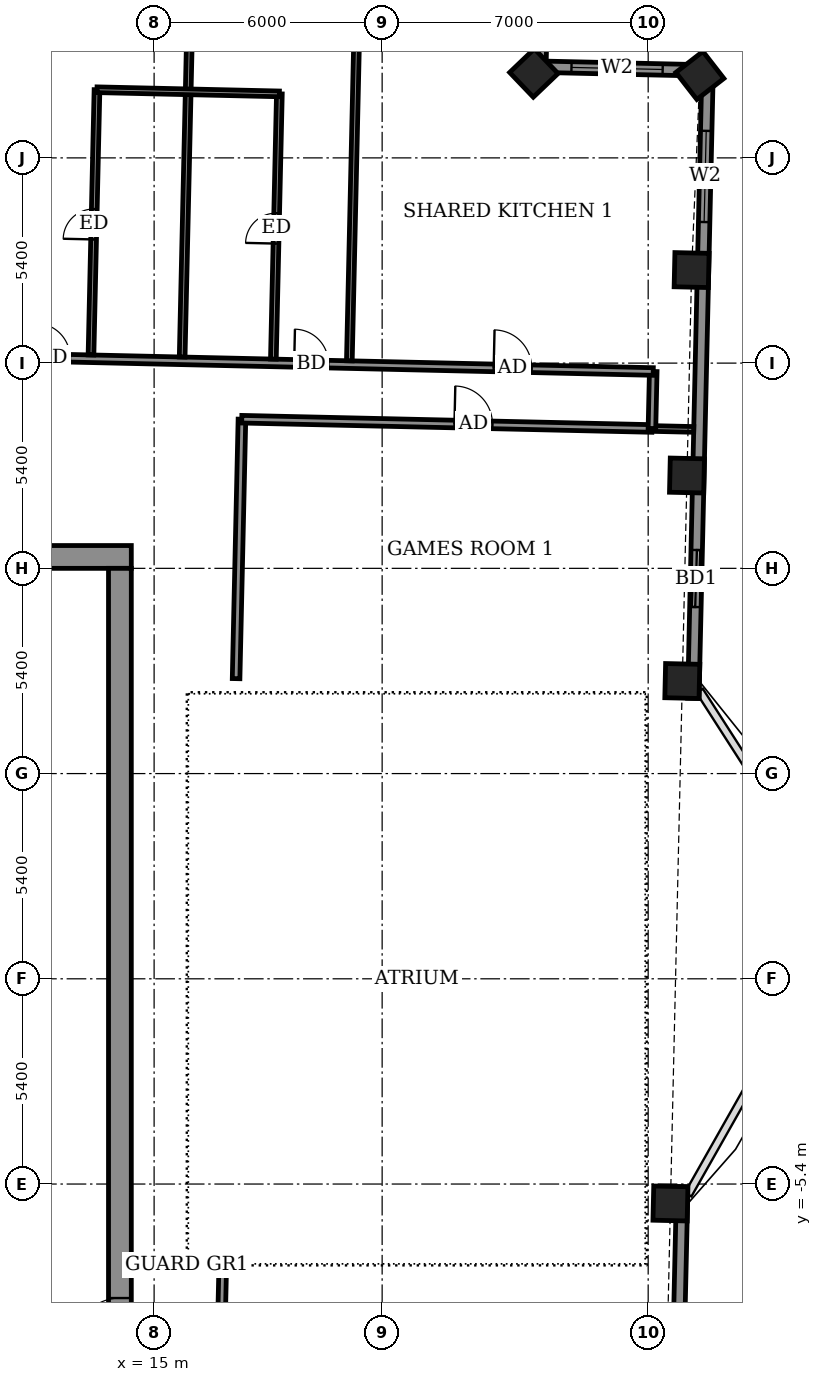
"""IFC4 building model, lengths in metres.
Left out: names, types, materials, properties, quantities, classifications, styles, units other than length and angle.
Written with IfcOpenShell. Run it as: python <this file> out.ifc"""

import sys

from ifc_helpers import new_model, si_unit, direction, frame, frame_2d, origin, origin_2d, place, context, subcontext, project, spatial, rectangle, extrude, element, fill, save


model = new_model("IFC4")
c1 = context("Model", 3, precision=1e-05, world=origin(), true_north=direction((0.0, 1.0)))
c2 = subcontext(c1, "Body", "Model", "MODEL_VIEW")
j1 = project(units=[si_unit("LENGTHUNIT", "METRE"), si_unit("PLANEANGLEUNIT", "RADIAN")], contexts=[c1])
p1 = place(None, origin())
s1 = spatial("IfcSite", under=j1, at=p1, CompositionType="ELEMENT")
p2 = place(p1, origin())
s2 = spatial("IfcBuilding", under=s1, at=p2, CompositionType="ELEMENT")
p3 = place(p2, frame((0.0, 0.0, 306.1)))
s3 = spatial("IfcBuildingStorey", under=s2, at=p3, CompositionType="ELEMENT", Elevation=306.1)
for number, where, z_axis, x_axis in (
    (1, (28.586, -5.912, -0.55), (0.0, 0.0, 1.0), (0.023, 1.0, 0.0)),
    (2, (28.898, 7.835, -0.55), (0.0, 0.0, 1.0), (0.023, 1.0, 0.0)),
    (3, (29.021, 13.242, -0.55), (0.0, 0.0, 1.0), (0.023, 1.0, 0.0)),
    (4, (29.143, 18.648, -0.55), (0.0, 0.0, 1.0), (0.023, 1.0, 0.0)),
    (5, (29.361, 23.769, -0.55), (0.0, 0.0, 1.0), (-0.613, 0.79, 0.0)),
    (6, (24.992, 23.834, -0.55), (0.0, 0.0, 1.0), (-0.691, 0.723, 0.0)),
):
    element("IfcColumn", number, at=place(p3, frame(where, z_axis=z_axis, x_axis=x_axis)), inside=s3, PredefinedType="COLUMN", context=c2, shape_type="SweptSolid", body=[
        extrude(rectangle(XDim=0.9, YDim=0.9, at=origin_2d()), origin(), (0.0, 0.0, 1.0), 3.6),
    ])
p4 = place(p3, frame((28.544, -20.99, 0.0), z_axis=(0.0, 0.0, 1.0), x_axis=(0.022676396018, 0.999742857471, 0.0)))
e7 = element("IfcWall", 7, at=p4, inside=s3, PredefinedType="SOLIDWALL", context=c2, shape_type="SweptSolid", body=[
    extrude(rectangle(XDim=15.525, YDim=0.3, at=frame_2d((7.762, 0.0))), origin(), (0.0, 0.0, 1.0), 2.55),
])
p5 = place(p4, frame((1.895, 0.0, 0.0)))
e8 = element("IfcOpeningElement", 8, at=p5, cuts=e7, PredefinedType="OPENING", context=c2, shape_type="SweptSolid", body=[
    extrude(rectangle(XDim=1.5, YDim=2.4, at=frame_2d((0.75, 1.2))), frame((0.0, 0.16, 0.0), z_axis=(0.0, -1.0, 0.0), x_axis=(1.0, 0.0, 0.0)), (0.0, 0.0, 1.0), 0.32),
])
p6 = place(p4, frame((10.946, 0.0, 0.9)))
e9 = element("IfcOpeningElement", 9, at=p6, cuts=e7, PredefinedType="OPENING", context=c2, shape_type="SweptSolid", body=[
    extrude(rectangle(XDim=1.2, YDim=1.5, at=frame_2d((0.6, 0.75))), frame((0.0, 0.16, 0.0), z_axis=(0.0, -1.0, 0.0), x_axis=(1.0, 0.0, 0.0)), (0.0, 0.0, 1.0), 0.32),
])
p7 = place(p3, frame((29.188, 7.379, 0.0), z_axis=(0.0, 0.0, 1.0), x_axis=(0.022693884957, 0.99974246063, 0.0)))
e10 = element("IfcWall", 10, at=p7, inside=s3, PredefinedType="SOLIDWALL", context=c2, shape_type="SweptSolid", body=[
    extrude(rectangle(XDim=16.524, YDim=0.3, at=frame_2d((8.262, 0.0))), origin(), (0.0, 0.0, 1.0), 2.55),
])
p8 = place(p7, frame((2.404, 0.0, 0.0)))
e11 = element("IfcOpeningElement", 11, at=p8, cuts=e10, PredefinedType="OPENING", context=c2, shape_type="SweptSolid", body=[
    extrude(rectangle(XDim=1.5, YDim=2.4, at=frame_2d((0.75, 1.2))), frame((0.0, 0.16, 0.0), z_axis=(0.0, -1.0, 0.0), x_axis=(1.0, 0.0, 0.0)), (0.0, 0.0, 1.0), 0.32),
])
p9 = place(p7, frame((12.536, 0.0, 0.9)))
e12 = element("IfcOpeningElement", 12, at=p9, cuts=e10, PredefinedType="OPENING", context=c2, shape_type="SweptSolid", body=[
    extrude(rectangle(XDim=2.4, YDim=1.5, at=frame_2d((1.2, 0.75))), frame((0.0, 0.16, 0.0), z_axis=(0.0, -1.0, 0.0), x_axis=(1.0, 0.0, 0.0)), (0.0, 0.0, 1.0), 0.32),
])
p10 = place(p3, frame((29.563, 23.899, 0.0), z_axis=(0.0, 0.0, 1.0), x_axis=(-0.999741204967, 0.022749133868, 0.0)))
e13 = element("IfcWall", 13, at=p10, inside=s3, PredefinedType="SOLIDWALL", context=c2, shape_type="SweptSolid", body=[
    extrude(rectangle(XDim=4.4, YDim=0.3, at=frame_2d((2.2, 0.0))), origin(), (0.0, 0.0, 1.0), 2.55),
])
p11 = place(p10, frame((1.182, 0.0, 0.9)))
e14 = element("IfcOpeningElement", 14, at=p11, cuts=e13, PredefinedType="OPENING", context=c2, shape_type="SweptSolid", body=[
    extrude(rectangle(XDim=2.4, YDim=1.5, at=frame_2d((1.2, 0.75))), frame((0.0, 0.16, 0.0), z_axis=(0.0, -1.0, 0.0), x_axis=(1.0, 0.0, 0.0)), (0.0, 0.0, 1.0), 0.32),
])
p12 = place(p3, frame((25.164, 23.999, 0.0), z_axis=(0.0, 0.0, 1.0), x_axis=(0.02269871331, 0.999742351016, 0.0)))
e15 = element("IfcWall", 15, at=p12, inside=s3, PredefinedType="SOLIDWALL", context=c2, shape_type="SweptSolid", body=[
    extrude(rectangle(XDim=4.399, YDim=0.3, at=frame_2d((2.2, 0.0))), origin(), (0.0, 0.0, 1.0), 2.55),
])
p13 = place(p12, frame((0.807, 0.0, 0.9)))
e16 = element("IfcOpeningElement", 16, at=p13, cuts=e15, PredefinedType="OPENING", context=c2, shape_type="SweptSolid", body=[
    extrude(rectangle(XDim=2.4, YDim=1.5, at=frame_2d((1.2, 0.75))), frame((0.0, 0.16, 0.0), z_axis=(0.0, -1.0, 0.0), x_axis=(1.0, 0.0, 0.0)), (0.0, 0.0, 1.0), 0.32),
])
p14 = place(p3, frame((16.684, -12.919, 0.0), z_axis=(0.0, 0.0, 1.0), x_axis=(0.022667483124, 0.999743059595, 0.0)))
e17 = element("IfcWall", 17, at=p14, inside=s3, PredefinedType="PARTITIONING", context=c2, shape_type="SweptSolid", body=[
    extrude(rectangle(XDim=5.245, YDim=0.2, at=frame_2d((2.623, 0.0))), origin(), (0.0, 0.0, 1.0), 3.05),
])
p15 = place(p3, frame((17.157, 7.898, 0.0), z_axis=(0.0, 0.0, 1.0), x_axis=(0.022562209343, 0.999745440955, 0.0)))
e18 = element("IfcWall", 18, at=p15, inside=s3, PredefinedType="PARTITIONING", context=c2, shape_type="SweptSolid", body=[
    extrude(rectangle(XDim=6.828, YDim=0.2, at=frame_2d((3.414, 0.0))), origin(), (0.0, 0.0, 1.0), 3.05),
])
p16 = place(p3, frame((17.306, 14.724, 0.0), z_axis=(0.0, 0.0, 1.0), x_axis=(0.999744269809, -0.022614043969, 0.0)))
e19 = element("IfcWall", 19, at=p16, inside=s3, PredefinedType="PARTITIONING", context=c2, shape_type="SweptSolid", body=[
    extrude(rectangle(XDim=10.796, YDim=0.2, at=frame_2d((5.398, 0.0))), origin(), (0.0, 0.0, 1.0), 3.05),
])
p17 = place(p16, frame((5.598, 0.0, 0.0)))
e20 = element("IfcOpeningElement", 20, at=p17, cuts=e19, PredefinedType="OPENING", context=c2, shape_type="SweptSolid", body=[
    extrude(rectangle(XDim=1.0, YDim=2.1, at=frame_2d((0.5, 1.05))), frame((0.0, 0.11, 0.0), z_axis=(0.0, -1.0, 0.0), x_axis=(1.0, 0.0, 0.0)), (0.0, 0.0, 1.0), 0.22),
])
p18 = place(p3, frame((28.099, 14.48, 0.0), z_axis=(0.0, 0.0, 1.0), x_axis=(0.999743779532, -0.022635708216, 0.0)))
e21 = element("IfcWall", 21, at=p18, inside=s3, PredefinedType="PARTITIONING", context=c2, shape_type="SweptSolid", body=[
    extrude(rectangle(XDim=1.1, YDim=0.15, at=frame_2d((0.55, 0.0))), origin(), (0.0, 0.0, 1.0), 2.55),
])
p19 = place(p3, frame((28.099, 14.48, 0.0), z_axis=(0.0, 0.0, 1.0), x_axis=(0.022632637625, 0.99974384905, 0.0)))
e22 = element("IfcWall", 22, at=p19, inside=s3, PredefinedType="PARTITIONING", context=c2, shape_type="SweptSolid", body=[
    extrude(rectangle(XDim=1.5, YDim=0.2, at=frame_2d((0.75, 0.0))), origin(), (0.0, 0.0, 1.0), 3.05),
])
p20 = place(p3, frame((-30.652, 17.313, 0.0), z_axis=(0.0, 0.0, 1.0), x_axis=(0.999742623764, -0.02268669719, 0.0)))
e23 = element("IfcWall", 23, at=p20, inside=s3, PredefinedType="PARTITIONING", context=c2, shape_type="SweptSolid", body=[
    extrude(rectangle(XDim=58.8, YDim=0.2, at=frame_2d((29.4, 0.0))), origin(), (0.0, 0.0, 1.0), 3.05),
])
p21 = place(p20, frame((54.601, 0.0, 0.0)))
e24 = element("IfcOpeningElement", 24, at=p21, cuts=e23, PredefinedType="OPENING", context=c2, shape_type="SweptSolid", body=[
    extrude(rectangle(XDim=1.0, YDim=2.1, at=frame_2d((0.5, 1.05))), frame((0.0, 0.11, 0.0), z_axis=(0.0, -1.0, 0.0), x_axis=(1.0, 0.0, 0.0)), (0.0, 0.0, 1.0), 0.22),
])
p22 = place(p20, frame((49.35, 0.0, 0.0)))
e25 = element("IfcOpeningElement", 25, at=p22, cuts=e23, PredefinedType="OPENING", context=c2, shape_type="SweptSolid", body=[
    extrude(rectangle(XDim=0.9, YDim=2.1, at=frame_2d((0.45, 1.05))), frame((0.0, 0.11, 0.0), z_axis=(0.0, -1.0, 0.0), x_axis=(1.0, 0.0, 0.0)), (0.0, 0.0, 1.0), 0.22),
])
p23 = place(p20, frame((42.55, 0.0, 0.0)))
e26 = element("IfcOpeningElement", 26, at=p23, cuts=e23, PredefinedType="OPENING", context=c2, shape_type="SweptSolid", body=[
    extrude(rectangle(XDim=0.9, YDim=2.1, at=frame_2d((0.45, 1.05))), frame((0.0, 0.11, 0.0), z_axis=(0.0, -1.0, 0.0), x_axis=(1.0, 0.0, 0.0)), (0.0, 0.0, 1.0), 0.22),
])
p24 = place(p20, frame((40.475, 0.0, 0.0)))
e27 = element("IfcOpeningElement", 27, at=p24, cuts=e23, PredefinedType="OPENING", context=c2, shape_type="SweptSolid", body=[
    extrude(rectangle(XDim=0.9, YDim=2.1, at=frame_2d((0.45, 1.05))), frame((0.0, 0.11, 0.0), z_axis=(0.0, -1.0, 0.0), x_axis=(1.0, 0.0, 0.0)), (0.0, 0.0, 1.0), 0.22),
])
p25 = place(p20, frame((33.6, 0.0, 0.0)))
e28 = element("IfcOpeningElement", 28, at=p25, cuts=e23, PredefinedType="OPENING", context=c2, shape_type="SweptSolid", body=[
    extrude(rectangle(XDim=0.9, YDim=2.1, at=frame_2d((0.45, 1.05))), frame((0.0, 0.11, 0.0), z_axis=(0.0, -1.0, 0.0), x_axis=(1.0, 0.0, 0.0)), (0.0, 0.0, 1.0), 0.22),
])
p26 = place(p20, frame((31.55, 0.0, 0.0)))
e29 = element("IfcOpeningElement", 29, at=p26, cuts=e23, PredefinedType="OPENING", context=c2, shape_type="SweptSolid", body=[
    extrude(rectangle(XDim=0.9, YDim=2.1, at=frame_2d((0.45, 1.05))), frame((0.0, 0.11, 0.0), z_axis=(0.0, -1.0, 0.0), x_axis=(1.0, 0.0, 0.0)), (0.0, 0.0, 1.0), 0.22),
])
p27 = place(p20, frame((24.425, 0.0, 0.0)))
e30 = element("IfcOpeningElement", 30, at=p27, cuts=e23, PredefinedType="OPENING", context=c2, shape_type="SweptSolid", body=[
    extrude(rectangle(XDim=0.9, YDim=2.1, at=frame_2d((0.45, 1.05))), frame((0.0, 0.11, 0.0), z_axis=(0.0, -1.0, 0.0), x_axis=(1.0, 0.0, 0.0)), (0.0, 0.0, 1.0), 0.22),
])
p28 = place(p20, frame((22.05, 0.0, 0.0)))
e31 = element("IfcOpeningElement", 31, at=p28, cuts=e23, PredefinedType="OPENING", context=c2, shape_type="SweptSolid", body=[
    extrude(rectangle(XDim=0.9, YDim=2.1, at=frame_2d((0.45, 1.05))), frame((0.0, 0.11, 0.0), z_axis=(0.0, -1.0, 0.0), x_axis=(1.0, 0.0, 0.0)), (0.0, 0.0, 1.0), 0.22),
])
p29 = place(p20, frame((14.95, 0.0, 0.0)))
e32 = element("IfcOpeningElement", 32, at=p29, cuts=e23, PredefinedType="OPENING", context=c2, shape_type="SweptSolid", body=[
    extrude(rectangle(XDim=0.9, YDim=2.1, at=frame_2d((0.45, 1.05))), frame((0.0, 0.11, 0.0), z_axis=(0.0, -1.0, 0.0), x_axis=(1.0, 0.0, 0.0)), (0.0, 0.0, 1.0), 0.22),
])
p30 = place(p20, frame((12.525, 0.0, 0.0)))
e33 = element("IfcOpeningElement", 33, at=p30, cuts=e23, PredefinedType="OPENING", context=c2, shape_type="SweptSolid", body=[
    extrude(rectangle(XDim=0.9, YDim=2.1, at=frame_2d((0.45, 1.05))), frame((0.0, 0.11, 0.0), z_axis=(0.0, -1.0, 0.0), x_axis=(1.0, 0.0, 0.0)), (0.0, 0.0, 1.0), 0.22),
])
p31 = place(p20, frame((4.032, 0.0, 0.0)))
e34 = element("IfcOpeningElement", 34, at=p31, cuts=e23, PredefinedType="OPENING", context=c2, shape_type="SweptSolid", body=[
    extrude(rectangle(XDim=1.0, YDim=2.1, at=frame_2d((0.5, 1.05))), frame((0.0, 0.11, 0.0), z_axis=(0.0, -1.0, 0.0), x_axis=(1.0, 0.0, 0.0)), (0.0, 0.0, 1.0), 0.22),
])
p32 = place(p3, frame((13.339, 16.415, 0.0), z_axis=(0.0, 0.0, 1.0), x_axis=(0.022630826984, 0.999743890039, 0.0)))
e35 = element("IfcWall", 35, at=p32, inside=s3, PredefinedType="PARTITIONING", context=c2, shape_type="SweptSolid", body=[
    extrude(rectangle(XDim=6.98, YDim=0.15, at=frame_2d((3.49, 0.0))), origin(), (0.0, 0.0, 1.0), 3.05),
])
p33 = place(p32, frame((3.04, 0.0, 0.0)))
e36 = element("IfcOpeningElement", 36, at=p33, cuts=e35, PredefinedType="OPENING", context=c2, shape_type="SweptSolid", body=[
    extrude(rectangle(XDim=0.8, YDim=2.1, at=frame_2d((0.4, 1.05))), frame((0.0, 0.085, 0.0), z_axis=(0.0, -1.0, 0.0), x_axis=(1.0, 0.0, 0.0)), (0.0, 0.0, 1.0), 0.17),
])
p34 = place(p3, frame((15.738, 16.36, 0.0), z_axis=(0.0, 0.0, 1.0), x_axis=(0.022740189192, 0.999741408463, 0.0)))
e37 = element("IfcWall", 37, at=p34, inside=s3, PredefinedType="PARTITIONING", context=c2, shape_type="SweptSolid", body=[
    extrude(rectangle(XDim=12.4, YDim=0.15, at=frame_2d((6.2, 0.0))), origin(), (0.0, 0.0, 1.0), 2.5),
])
p35 = place(p3, frame((18.138, 16.306, 0.0), z_axis=(0.0, 0.0, 1.0), x_axis=(0.022630826984, 0.999743890039, 0.0)))
e38 = element("IfcWall", 38, at=p35, inside=s3, PredefinedType="PARTITIONING", context=c2, shape_type="SweptSolid", body=[
    extrude(rectangle(XDim=6.98, YDim=0.15, at=frame_2d((3.49, 0.0))), origin(), (0.0, 0.0, 1.0), 3.05),
])
p36 = place(p35, frame((3.04, 0.0, 0.0)))
e39 = element("IfcOpeningElement", 39, at=p36, cuts=e38, PredefinedType="OPENING", context=c2, shape_type="SweptSolid", body=[
    extrude(rectangle(XDim=0.8, YDim=2.1, at=frame_2d((0.4, 1.05))), frame((0.0, 0.085, 0.0), z_axis=(0.0, -1.0, 0.0), x_axis=(1.0, 0.0, 0.0)), (0.0, 0.0, 1.0), 0.17),
])
p37 = place(p3, frame((20.137, 16.261, 0.0), z_axis=(0.0, 0.0, 1.0), x_axis=(0.022663260168, 0.999743155335, 0.0)))
e40 = element("IfcWall", 40, at=p37, inside=s3, PredefinedType="PARTITIONING", context=c2, shape_type="SweptSolid", body=[
    extrude(rectangle(XDim=12.399, YDim=0.15, at=frame_2d((6.2, 0.0))), origin(), (0.0, 0.0, 1.0), 2.5),
])
p38 = place(p3, frame((13.497, 23.393, 0.0), z_axis=(0.0, 0.0, 1.0), x_axis=(0.999741520352, -0.022735269617, 0.0)))
e41 = element("IfcWall", 41, at=p38, inside=s3, PredefinedType="PARTITIONING", context=c2, shape_type="SweptSolid", body=[
    extrude(rectangle(XDim=4.8, YDim=0.15, at=frame_2d((2.4, 0.0))), origin(), (0.0, 0.0, 1.0), 3.05),
])
p39 = place(p3, frame((-14.4, 11.1, 0.0), z_axis=(0.0, 0.0, 1.0), x_axis=(1.0, 0.0, 0.0)))
e42 = element("IfcWall", 42, at=p39, inside=s3, PredefinedType="SHEAR", context=c2, shape_type="SweptSolid", body=[
    extrude(rectangle(XDim=28.8, YDim=0.6, at=frame_2d((14.4, 0.0))), origin(), (0.0, 0.0, 1.0), 3.6),
])
p40 = place(p3, frame((14.1, -10.8, 0.0), z_axis=(0.0, 0.0, 1.0), x_axis=(0.0, 1.0, 0.0)))
e43 = element("IfcWall", 43, at=p40, inside=s3, PredefinedType="SHEAR", context=c2, shape_type="SweptSolid", body=[
    extrude(rectangle(XDim=21.6, YDim=0.6, at=frame_2d((10.8, 0.0))), origin(), (0.0, 0.0, 1.0), 3.6),
])
p41 = place(p40, frame((1.2, 0.0, 0.0)))
e44 = element("IfcOpeningElement", 44, at=p41, cuts=e43, PredefinedType="OPENING", context=c2, shape_type="SweptSolid", body=[
    extrude(rectangle(XDim=1.2, YDim=2.1, at=frame_2d((0.6, 1.05))), frame((0.0, 0.31, 0.0), z_axis=(0.0, -1.0, 0.0), x_axis=(1.0, 0.0, 0.0)), (0.0, 0.0, 1.0), 0.62),
])
p42 = place(p8, origin())
e45 = element("IfcDoor", 45, at=p42, inside=s3, OperationType="SLIDING_TO_LEFT", PredefinedType="DOOR", context=c2, shape_type="SweptSolid", body=[
    extrude(rectangle(XDim=1.5, YDim=2.4, at=frame_2d((0.75, 1.2))), frame((0.0, 0.025, 0.0), z_axis=(0.0, -1.0, 0.0), x_axis=(1.0, 0.0, 0.0)), (0.0, 0.0, 1.0), 0.05),
])
fill(e11, e45)
p43 = place(p9, origin())
e46 = element("IfcWindow", 46, at=p43, inside=s3, PartitioningType="DOUBLE_PANEL_VERTICAL", PredefinedType="WINDOW", context=c2, shape_type="SweptSolid", body=[
    extrude(rectangle(XDim=2.4, YDim=1.5, at=frame_2d((1.2, 0.75))), frame((0.0, 0.03, 0.0), z_axis=(0.0, -1.0, 0.0), x_axis=(1.0, 0.0, 0.0)), (0.0, 0.0, 1.0), 0.06),
])
fill(e12, e46)
p44 = place(p11, origin())
e47 = element("IfcWindow", 47, at=p44, inside=s3, PartitioningType="DOUBLE_PANEL_VERTICAL", PredefinedType="WINDOW", context=c2, shape_type="SweptSolid", body=[
    extrude(rectangle(XDim=2.4, YDim=1.5, at=frame_2d((1.2, 0.75))), frame((0.0, 0.03, 0.0), z_axis=(0.0, -1.0, 0.0), x_axis=(1.0, 0.0, 0.0)), (0.0, 0.0, 1.0), 0.06),
])
fill(e14, e47)
p45 = place(p17, origin())
e48 = element("IfcDoor", 48, at=p45, inside=s3, OperationType="SINGLE_SWING_RIGHT", PredefinedType="DOOR", context=c2, shape_type="SweptSolid", body=[
    extrude(rectangle(XDim=1.0, YDim=2.1, at=frame_2d((0.5, 1.05))), frame((0.0, 0.025, 0.0), z_axis=(0.0, -1.0, 0.0), x_axis=(1.0, 0.0, 0.0)), (0.0, 0.0, 1.0), 0.05),
])
fill(e20, e48)
p46 = place(p21, origin())
e49 = element("IfcDoor", 49, at=p46, inside=s3, OperationType="SINGLE_SWING_LEFT", PredefinedType="DOOR", context=c2, shape_type="SweptSolid", body=[
    extrude(rectangle(XDim=1.0, YDim=2.1, at=frame_2d((0.5, 1.05))), frame((0.0, 0.025, 0.0), z_axis=(0.0, -1.0, 0.0), x_axis=(1.0, 0.0, 0.0)), (0.0, 0.0, 1.0), 0.05),
])
fill(e24, e49)
p47 = place(p22, origin())
e50 = element("IfcDoor", 50, at=p47, inside=s3, OperationType="SINGLE_SWING_LEFT", PredefinedType="DOOR", context=c2, shape_type="SweptSolid", body=[
    extrude(rectangle(XDim=0.9, YDim=2.1, at=frame_2d((0.45, 1.05))), frame((0.0, 0.025, 0.0), z_axis=(0.0, -1.0, 0.0), x_axis=(1.0, 0.0, 0.0)), (0.0, 0.0, 1.0), 0.05),
])
fill(e25, e50)
p48 = place(p36, origin())
e51 = element("IfcDoor", 51, at=p48, inside=s3, OperationType="SINGLE_SWING_LEFT", PredefinedType="DOOR", context=c2, shape_type="SweptSolid", body=[
    extrude(rectangle(XDim=0.8, YDim=2.1, at=frame_2d((0.4, 1.05))), frame((0.0, 0.025, 0.0), z_axis=(0.0, -1.0, 0.0), x_axis=(1.0, 0.0, 0.0)), (0.0, 0.0, 1.0), 0.05),
])
fill(e39, e51)
p49 = place(p23, origin())
e52 = element("IfcDoor", 52, at=p49, inside=s3, OperationType="SINGLE_SWING_RIGHT", PredefinedType="DOOR", context=c2, shape_type="SweptSolid", body=[
    extrude(rectangle(XDim=0.9, YDim=2.1, at=frame_2d((0.45, 1.05))), frame((0.0, 0.025, 0.0), z_axis=(0.0, -1.0, 0.0), x_axis=(1.0, 0.0, 0.0)), (0.0, 0.0, 1.0), 0.05),
])
fill(e26, e52)
p50 = place(p33, origin())
e53 = element("IfcDoor", 53, at=p50, inside=s3, OperationType="SINGLE_SWING_RIGHT", PredefinedType="DOOR", context=c2, shape_type="SweptSolid", body=[
    extrude(rectangle(XDim=0.8, YDim=2.1, at=frame_2d((0.4, 1.05))), frame((0.0, 0.025, 0.0), z_axis=(0.0, -1.0, 0.0), x_axis=(1.0, 0.0, 0.0)), (0.0, 0.0, 1.0), 0.05),
])
fill(e36, e53)
p51 = place(p41, origin())
e54 = element("IfcDoor", 54, at=p51, inside=s3, OperationType="DOUBLE_DOOR_SINGLE_SWING", PredefinedType="DOOR", context=c2, shape_type="SweptSolid", body=[
    extrude(rectangle(XDim=1.2, YDim=2.1, at=frame_2d((0.6, 1.05))), frame((0.0, 0.025, 0.0), z_axis=(0.0, -1.0, 0.0), x_axis=(1.0, 0.0, 0.0)), (0.0, 0.0, 1.0), 0.05),
])
fill(e44, e54)
save(model, sys.argv[1])
